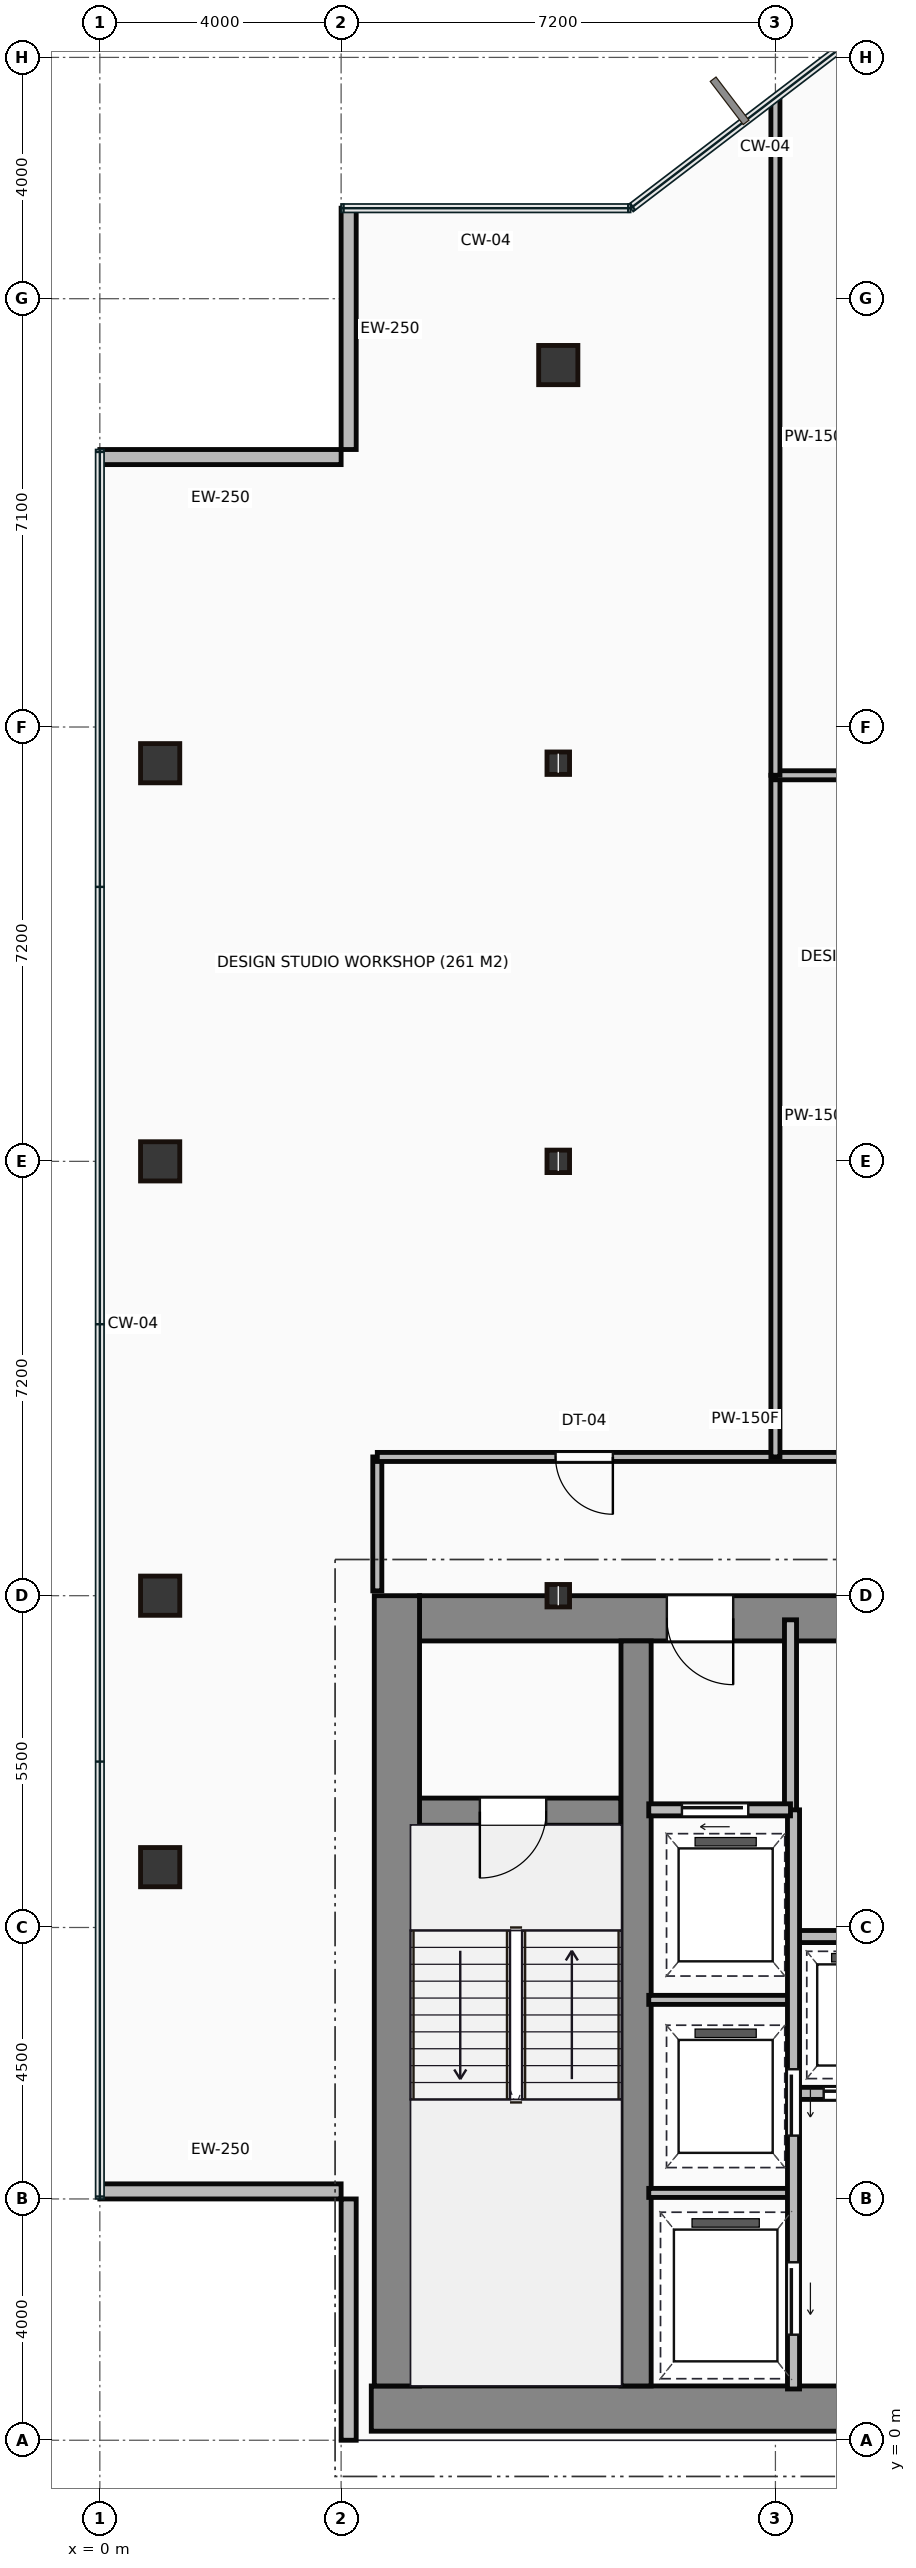
"""IFC4 building model, lengths in metres.
Left out: names, types, materials, properties, quantities, classifications, styles, units other than length and angle.
Written with IfcOpenShell. Run it as: python <this file> out.ifc"""

import sys

from ifc_helpers import new_model, si_unit, direction, frame, frame_2d, origin, origin_2d, place, context, subcontext, project, spatial, rectangle, hollow_rectangle, i_section, extrude, source, transform, mapped, element, fill, save


model = new_model("IFC4")
c1 = context("Model", 3, precision=1e-05, world=origin(), true_north=direction((0.0, 1.0)))
c2 = subcontext(c1, "Body", "Model", "MODEL_VIEW")
j1 = project(units=[si_unit("LENGTHUNIT", "METRE"), si_unit("PLANEANGLEUNIT", "RADIAN")], contexts=[c1])
p1 = place(None, origin())
s1 = spatial("IfcSite", under=j1, at=p1, CompositionType="ELEMENT")
p2 = place(p1, origin())
s2 = spatial("IfcBuilding", under=s1, at=p2, CompositionType="ELEMENT")
p3 = place(p2, frame((0.0, 0.0, 144.25)))
s3 = spatial("IfcBuildingStorey", under=s2, at=p3, CompositionType="ELEMENT", Elevation=144.25)
m1 = source(origin(), c2, "Body", "SweptSolid", [
    extrude(rectangle(XDim=29.5, YDim=0.75, at=frame_2d((14.75, 0.0))), origin(), (0.0, 0.0, 1.0), 3.65),
])
p4 = place(p3, frame((4.5, 0.525, 0.0), z_axis=(0.0, 0.0, 1.0), x_axis=(1.0, 0.0, 0.0)))
e1 = element("IfcWall", 1, at=p4, inside=s3, PredefinedType="SHEAR", context=c2, shape_type="MappedRepresentation", body=[
    mapped(m1, transform((0.0, 0.0, 0.0))),
])
m2 = source(origin(), c2, "Body", "SweptSolid", [
    extrude(rectangle(XDim=13.1, YDim=0.75, at=frame_2d((6.55, 0.0))), origin(), (0.0, 0.0, 1.0), 3.65),
])
p5 = place(p3, frame((4.925, 0.9, 0.0), z_axis=(0.0, 0.0, 1.0), x_axis=(0.0, 1.0, 0.0)))
e2 = element("IfcWall", 2, at=p5, inside=s3, PredefinedType="SHEAR", context=c2, shape_type="MappedRepresentation", body=[
    mapped(m2, transform((0.0, 0.0, 0.0))),
])
m3 = source(origin(), c2, "Body", "SweptSolid", [
    extrude(rectangle(XDim=9.1, YDim=0.75, at=frame_2d((4.55, 0.0))), origin(), (0.0, 0.0, 1.0), 3.65),
])
p6 = place(p3, frame((5.3, 13.625, 0.0), z_axis=(0.0, 0.0, 1.0), x_axis=(1.0, 0.0, 0.0)))
e3 = element("IfcWall", 3, at=p6, inside=s3, PredefinedType="SHEAR", context=c2, shape_type="MappedRepresentation", body=[
    mapped(m3, transform((0.0, 0.0, 0.0))),
])
p7 = place(p6, frame((4.1, 0.0, 0.0)))
e4 = element("IfcOpeningElement", 4, at=p7, cuts=e3, PredefinedType="OPENING", context=c2, shape_type="SweptSolid", body=[
    extrude(rectangle(XDim=1.1, YDim=2.15, at=frame_2d((0.55, 1.075))), frame((0.0, 0.385, 0.0), z_axis=(0.0, -1.0, 0.0), x_axis=(1.0, 0.0, 0.0)), (0.0, 0.0, 1.0), 0.77),
])
m4 = source(origin(), c2, "Body", "SweptSolid", [
    extrude(rectangle(XDim=12.35, YDim=0.5, at=frame_2d((6.175, 0.0))), origin(), (0.0, 0.0, 1.0), 3.65),
])
p8 = place(p3, frame((8.89, 0.9, 0.0), z_axis=(0.0, 0.0, 1.0), x_axis=(0.0, 1.0, 0.0)))
e5 = element("IfcWall", 5, at=p8, inside=s3, PredefinedType="SHEAR", context=c2, shape_type="MappedRepresentation", body=[
    mapped(m4, transform((0.0, 0.0, 0.0))),
])
m5 = source(origin(), c2, "Body", "SweptSolid", [
    extrude(rectangle(XDim=3.39, YDim=0.45, at=frame_2d((1.695, 0.0))), origin(), (0.0, 0.0, 1.0), 3.65),
])
p9 = place(p3, frame((5.25, 10.42, 0.0), z_axis=(0.0, 0.0, 1.0), x_axis=(1.0, 0.0, 0.0)))
e6 = element("IfcWall", 6, at=p9, inside=s3, PredefinedType="SHEAR", context=c2, shape_type="MappedRepresentation", body=[
    mapped(m5, transform((0.0, 0.0, 0.0))),
])
p10 = place(p9, frame((1.05, 0.0, 0.0)))
e7 = element("IfcOpeningElement", 7, at=p10, cuts=e6, PredefinedType="OPENING", context=c2, shape_type="SweptSolid", body=[
    extrude(rectangle(XDim=1.1, YDim=2.15, at=frame_2d((0.55, 1.075))), frame((0.0, 0.235, 0.0), z_axis=(0.0, -1.0, 0.0), x_axis=(1.0, 0.0, 0.0)), (0.0, 0.0, 1.0), 0.47),
])
m6 = source(origin(), c2, "Body", "SweptSolid", [
    extrude(hollow_rectangle(XDim=0.65, YDim=0.65, WallThickness=0.032, at=origin_2d()), origin(), (0.0, 0.0, 1.0), 3.65),
])
for number, where, z_axis, x_axis in (
    (8, (1.0, 9.5, 0.0), (0.0, 0.0, 1.0), (1.0, 0.0, 0.0)),
    (9, (1.0, 14.0, 0.0), (0.0, 0.0, 1.0), (1.0, 0.0, 0.0)),
    (10, (1.0, 21.2, 0.0), (0.0, 0.0, 1.0), (1.0, 0.0, 0.0)),
    (11, (1.0, 27.8, 0.0), (0.0, 0.0, 1.0), (1.0, 0.0, 0.0)),
):
    element("IfcColumn", number, at=place(p3, frame(where, z_axis=z_axis, x_axis=x_axis)), inside=s3, PredefinedType="COLUMN", context=c2, shape_type="MappedRepresentation", body=[
        mapped(m6, transform((0.0, 0.0, 0.0))),
    ])
m7 = source(origin(), c2, "Body", "SweptSolid", [
    extrude(i_section(OverallWidth=0.374, OverallDepth=0.372, WebThickness=0.016, FlangeThickness=0.026, at=origin_2d()), origin(), (0.0, 0.0, 1.0), 3.65),
])
for number, where, z_axis, x_axis in (
    (12, (7.6, 14.0, 0.0), (0.0, 0.0, 1.0), (1.0, 0.0, 0.0)),
    (13, (7.6, 21.2, 0.0), (0.0, 0.0, 1.0), (1.0, 0.0, 0.0)),
    (14, (7.6, 27.8, 0.0), (0.0, 0.0, 1.0), (1.0, 0.0, 0.0)),
):
    element("IfcColumn", number, at=place(p3, frame(where, z_axis=z_axis, x_axis=x_axis)), inside=s3, PredefinedType="COLUMN", context=c2, shape_type="MappedRepresentation", body=[
        mapped(m7, transform((0.0, 0.0, 0.0))),
    ])
p11 = place(p3, frame((7.6, 34.4, 0.0), z_axis=(0.0, 0.0, 1.0), x_axis=(1.0, 0.0, 0.0)))
e15 = element("IfcColumn", 15, at=p11, inside=s3, PredefinedType="COLUMN", context=c2, shape_type="MappedRepresentation", body=[
    mapped(m6, transform((0.0, 0.0, 0.0))),
])
m8 = source(origin(), c2, "Body", "SweptSolid", [
    extrude(rectangle(XDim=4.0, YDim=0.25, at=frame_2d((2.0, 0.0))), origin(), (0.0, 0.0, 1.0), 3.4),
])
for number, where, z_axis, x_axis in (
    (16, (4.125, 37.0, 0.0), (0.0, 0.0, 1.0), (0.0, -1.0, 0.0)),
    (17, (4.0, 32.875, 0.0), (0.0, 0.0, 1.0), (-1.0, 0.0, 0.0)),
    (18, (0.0, 4.125, 0.0), (0.0, 0.0, 1.0), (1.0, 0.0, 0.0)),
    (19, (4.125, 4.0, 0.0), (0.0, 0.0, 1.0), (0.0, -1.0, 0.0)),
):
    element("IfcWall", number, at=place(p3, frame(where, z_axis=z_axis, x_axis=x_axis)), inside=s3, PredefinedType="STANDARD", context=c2, shape_type="MappedRepresentation", body=[
        mapped(m8, transform((0.0, 0.0, 0.0))),
    ])
m9 = source(origin(), c2, "Body", "SweptSolid", [
    extrude(rectangle(XDim=3.18, YDim=0.2, at=frame_2d((1.59, 0.0))), origin(), (0.0, 0.0, 1.0), 3.4),
])
p12 = place(p3, frame((11.45, 10.42, 0.0), z_axis=(0.0, 0.0, 1.0), x_axis=(0.0, 1.0, 0.0)))
e20 = element("IfcWall", 20, at=p12, inside=s3, PredefinedType="PARTITIONING", context=c2, shape_type="MappedRepresentation", body=[
    mapped(m9, transform((0.0, 0.0, 0.0))),
])
m10 = source(origin(), c2, "Body", "SweptSolid", [
    extrude(rectangle(XDim=2.35, YDim=0.2, at=frame_2d((1.175, 0.0))), origin(), (0.0, 0.0, 1.0), 3.4),
])
p13 = place(p3, frame((9.1, 10.45, 0.0), z_axis=(0.0, 0.0, 1.0), x_axis=(1.0, 0.0, 0.0)))
e21 = element("IfcWall", 21, at=p13, inside=s3, PredefinedType="PARTITIONING", context=c2, shape_type="MappedRepresentation", body=[
    mapped(m10, transform((0.0, 0.0, 0.0))),
])
p14 = place(p13, frame((0.55, 0.0, 0.0)))
e22 = element("IfcOpeningElement", 22, at=p14, cuts=e21, PredefinedType="OPENING", context=c2, shape_type="SweptSolid", body=[
    extrude(rectangle(XDim=1.1, YDim=2.15, at=frame_2d((0.55, 1.075))), frame((0.0, 0.11, 0.0), z_axis=(0.0, -1.0, 0.0), x_axis=(1.0, 0.0, 0.0)), (0.0, 0.0, 1.0), 0.22),
])
m11 = source(origin(), c2, "Body", "SweptSolid", [
    extrude(rectangle(XDim=9.6, YDim=0.2, at=frame_2d((4.8, 0.0))), origin(), (0.0, 0.0, 1.0), 3.4),
])
p15 = place(p3, frame((11.5, 0.85, 0.0), z_axis=(0.0, 0.0, 1.0), x_axis=(0.0, 1.0, 0.0)))
e23 = element("IfcWall", 23, at=p15, inside=s3, PredefinedType="PARTITIONING", context=c2, shape_type="MappedRepresentation", body=[
    mapped(m11, transform((0.0, 0.0, 0.0))),
])
p16 = place(p15, frame((4.2, 0.0, 0.0)))
e24 = element("IfcOpeningElement", 24, at=p16, cuts=e23, PredefinedType="OPENING", context=c2, shape_type="SweptSolid", body=[
    extrude(rectangle(XDim=1.1, YDim=2.15, at=frame_2d((0.55, 1.075))), frame((0.0, 0.11, 0.0), z_axis=(0.0, -1.0, 0.0), x_axis=(1.0, 0.0, 0.0)), (0.0, 0.0, 1.0), 0.22),
])
p17 = place(p15, frame((0.9, 0.0, 0.0)))
e25 = element("IfcOpeningElement", 25, at=p17, cuts=e23, PredefinedType="OPENING", context=c2, shape_type="SweptSolid", body=[
    extrude(rectangle(XDim=1.2, YDim=2.15, at=frame_2d((0.6, 1.075))), frame((0.0, 0.11, 0.0), z_axis=(0.0, -1.0, 0.0), x_axis=(1.0, 0.0, 0.0)), (0.0, 0.0, 1.0), 0.22),
])
m12 = source(origin(), c2, "Body", "SweptSolid", [
    extrude(rectangle(XDim=2.4, YDim=0.15, at=frame_2d((1.2, 0.0))), origin(), (0.0, 0.0, 1.0), 3.4),
])
for number, where, z_axis, x_axis in (
    (26, (9.1, 4.1, 0.0), (0.0, 0.0, 1.0), (1.0, 0.0, 0.0)),
    (27, (9.1, 7.3, 0.0), (0.0, 0.0, 1.0), (1.0, 0.0, 0.0)),
):
    element("IfcWall", number, at=place(p3, frame(where, z_axis=z_axis, x_axis=x_axis)), inside=s3, PredefinedType="PARTITIONING", context=c2, shape_type="MappedRepresentation", body=[
        mapped(m12, transform((0.0, 0.0, 0.0))),
    ])
m13 = source(origin(), c2, "Body", "SweptSolid", [
    extrude(rectangle(XDim=11.85, YDim=0.2, at=frame_2d((5.925, 0.0))), origin(), (0.0, 0.0, 1.0), 3.4),
])
p18 = place(p3, frame((11.55, 5.75, 0.0), z_axis=(0.0, 0.0, 1.0), x_axis=(1.0, 0.0, 0.0)))
e28 = element("IfcWall", 28, at=p18, inside=s3, PredefinedType="PARTITIONING", context=c2, shape_type="MappedRepresentation", body=[
    mapped(m13, transform((0.0, 0.0, 0.0))),
])
p19 = place(p18, frame((0.45, 0.0, 0.0)))
e29 = element("IfcOpeningElement", 29, at=p19, cuts=e28, PredefinedType="OPENING", context=c2, shape_type="SweptSolid", body=[
    extrude(rectangle(XDim=1.05, YDim=2.15, at=frame_2d((0.525, 1.075))), frame((0.0, 0.11, 0.0), z_axis=(0.0, -1.0, 0.0), x_axis=(1.0, 0.0, 0.0)), (0.0, 0.0, 1.0), 0.22),
])
p20 = place(p18, frame((2.4, 0.0, 0.0)))
e30 = element("IfcOpeningElement", 30, at=p20, cuts=e28, PredefinedType="OPENING", context=c2, shape_type="SweptSolid", body=[
    extrude(rectangle(XDim=1.05, YDim=2.15, at=frame_2d((0.525, 1.075))), frame((0.0, 0.11, 0.0), z_axis=(0.0, -1.0, 0.0), x_axis=(1.0, 0.0, 0.0)), (0.0, 0.0, 1.0), 0.22),
])
p21 = place(p18, frame((4.35, 0.0, 0.0)))
e31 = element("IfcOpeningElement", 31, at=p21, cuts=e28, PredefinedType="OPENING", context=c2, shape_type="SweptSolid", body=[
    extrude(rectangle(XDim=1.05, YDim=2.15, at=frame_2d((0.525, 1.075))), frame((0.0, 0.11, 0.0), z_axis=(0.0, -1.0, 0.0), x_axis=(1.0, 0.0, 0.0)), (0.0, 0.0, 1.0), 0.22),
])
p22 = place(p18, frame((6.3, 0.0, 0.0)))
e32 = element("IfcOpeningElement", 32, at=p22, cuts=e28, PredefinedType="OPENING", context=c2, shape_type="SweptSolid", body=[
    extrude(rectangle(XDim=1.05, YDim=2.15, at=frame_2d((0.525, 1.075))), frame((0.0, 0.11, 0.0), z_axis=(0.0, -1.0, 0.0), x_axis=(1.0, 0.0, 0.0)), (0.0, 0.0, 1.0), 0.22),
])
p23 = place(p18, frame((8.25, 0.0, 0.0)))
e33 = element("IfcOpeningElement", 33, at=p23, cuts=e28, PredefinedType="OPENING", context=c2, shape_type="SweptSolid", body=[
    extrude(rectangle(XDim=1.05, YDim=2.15, at=frame_2d((0.525, 1.075))), frame((0.0, 0.11, 0.0), z_axis=(0.0, -1.0, 0.0), x_axis=(1.0, 0.0, 0.0)), (0.0, 0.0, 1.0), 0.22),
])
p24 = place(p18, frame((10.2, 0.0, 0.0)))
e34 = element("IfcOpeningElement", 34, at=p24, cuts=e28, PredefinedType="OPENING", context=c2, shape_type="SweptSolid", body=[
    extrude(rectangle(XDim=1.05, YDim=2.15, at=frame_2d((0.525, 1.075))), frame((0.0, 0.11, 0.0), z_axis=(0.0, -1.0, 0.0), x_axis=(1.0, 0.0, 0.0)), (0.0, 0.0, 1.0), 0.22),
])
p25 = place(p3, frame((11.55, 8.35, 0.0), z_axis=(0.0, 0.0, 1.0), x_axis=(1.0, 0.0, 0.0)))
e35 = element("IfcWall", 35, at=p25, inside=s3, PredefinedType="PARTITIONING", context=c2, shape_type="MappedRepresentation", body=[
    mapped(m13, transform((0.0, 0.0, 0.0))),
])
m14 = source(origin(), c2, "Body", "SweptSolid", [
    extrude(rectangle(XDim=2.22, YDim=0.15, at=frame_2d((1.11, 0.0))), origin(), (0.0, 0.0, 1.0), 3.4),
])
p26 = place(p3, frame((4.6, 14.08, 0.0), z_axis=(0.0, 0.0, 1.0), x_axis=(0.0, 1.0, 0.0)))
e36 = element("IfcWall", 36, at=p26, inside=s3, PredefinedType="PARTITIONING", context=c2, shape_type="MappedRepresentation", body=[
    mapped(m14, transform((0.0, 0.0, 0.0))),
])
m15 = source(origin(), c2, "Body", "SweptSolid", [
    extrude(rectangle(XDim=12.2, YDim=0.15, at=frame_2d((6.1, 0.0))), origin(), (0.0, 0.0, 1.0), 3.4),
])
p27 = place(p3, frame((4.6, 16.3, 0.0), z_axis=(0.0, 0.0, 1.0), x_axis=(1.0, 0.0, 0.0)))
e37 = element("IfcWall", 37, at=p27, inside=s3, PredefinedType="PARTITIONING", context=c2, shape_type="MappedRepresentation", body=[
    mapped(m15, transform((0.0, 0.0, 0.0))),
])
p28 = place(p27, frame((2.955, 0.0, 0.0)))
e38 = element("IfcOpeningElement", 38, at=p28, cuts=e37, PredefinedType="OPENING", context=c2, shape_type="SweptSolid", body=[
    extrude(rectangle(XDim=0.95, YDim=2.15, at=frame_2d((0.475, 1.075))), frame((0.0, 0.085, 0.0), z_axis=(0.0, -1.0, 0.0), x_axis=(1.0, 0.0, 0.0)), (0.0, 0.0, 1.0), 0.17),
])
m16 = source(origin(), c2, "Body", "SweptSolid", [
    extrude(rectangle(XDim=11.3, YDim=0.15, at=frame_2d((5.65, 0.0))), origin(), (0.0, 0.0, 1.0), 3.4),
])
p29 = place(p3, frame((11.2, 27.6, 0.0), z_axis=(0.0, 0.0, 1.0), x_axis=(0.0, -1.0, 0.0)))
e39 = element("IfcWall", 39, at=p29, inside=s3, PredefinedType="PARTITIONING", context=c2, shape_type="MappedRepresentation", body=[
    mapped(m16, transform((0.0, 0.0, 0.0))),
])
m17 = source(origin(), c2, "Body", "SweptSolid", [
    extrude(rectangle(XDim=5.6, YDim=0.15, at=frame_2d((2.8, 0.0))), origin(), (0.0, 0.0, 1.0), 3.4),
])
p30 = place(p3, frame((11.2, 27.6, 0.0), z_axis=(0.0, 0.0, 1.0), x_axis=(1.0, 0.0, 0.0)))
e40 = element("IfcWall", 40, at=p30, inside=s3, PredefinedType="PARTITIONING", context=c2, shape_type="MappedRepresentation", body=[
    mapped(m17, transform((0.0, 0.0, 0.0))),
])
m18 = source(origin(), c2, "Body", "SweptSolid", [
    extrude(rectangle(XDim=11.206, YDim=0.15, at=frame_2d((5.603, 0.0))), origin(), (0.0, 0.0, 1.0), 3.4),
])
p31 = place(p3, frame((11.2, 38.806, 0.0), z_axis=(0.0, 0.0, 1.0), x_axis=(0.0, -1.0, 0.0)))
e41 = element("IfcWall", 41, at=p31, inside=s3, PredefinedType="PARTITIONING", context=c2, shape_type="MappedRepresentation", body=[
    mapped(m18, transform((0.0, 0.0, 0.0))),
])
m19 = source(origin(), c2, "Body", "SweptSolid", [
    extrude(rectangle(XDim=1.1, YDim=2.15, at=frame_2d((0.55, 1.075))), frame((0.0, 0.025, 0.0), z_axis=(0.0, -1.0, 0.0), x_axis=(1.0, 0.0, 0.0)), (0.0, 0.0, 1.0), 0.05),
])
p32 = place(p10, frame((1.1, 0.0, 0.0), z_axis=(0.0, 0.0, 1.0), x_axis=(-1.0, 0.0, 0.0)))
e42 = element("IfcDoor", 42, at=p32, inside=s3, OperationType="SINGLE_SWING_LEFT", PredefinedType="DOOR", context=c2, shape_type="MappedRepresentation", body=[
    mapped(m19, transform((0.0, 0.0, 0.0))),
])
fill(e7, e42)
p33 = place(p7, origin())
e43 = element("IfcDoor", 43, at=p33, inside=s3, OperationType="SINGLE_SWING_RIGHT", PredefinedType="DOOR", context=c2, shape_type="MappedRepresentation", body=[
    mapped(m19, transform((0.0, 0.0, 0.0))),
])
fill(e4, e43)
p34 = place(p14, origin())
e44 = element("IfcDoor", 44, at=p34, inside=s3, OperationType="SLIDING_TO_LEFT", PredefinedType="DOOR", context=c2, shape_type="MappedRepresentation", body=[
    mapped(m19, transform((0.0, 0.0, 0.0))),
])
fill(e22, e44)
p35 = place(p16, frame((1.1, 0.0, 0.0), z_axis=(0.0, 0.0, 1.0), x_axis=(-1.0, 0.0, 0.0)))
e45 = element("IfcDoor", 45, at=p35, inside=s3, OperationType="SLIDING_TO_LEFT", PredefinedType="DOOR", context=c2, shape_type="MappedRepresentation", body=[
    mapped(m19, transform((0.0, 0.0, 0.0))),
])
fill(e24, e45)
m20 = source(origin(), c2, "Body", "SweptSolid", [
    extrude(rectangle(XDim=1.2, YDim=2.15, at=frame_2d((0.6, 1.075))), frame((0.0, 0.025, 0.0), z_axis=(0.0, -1.0, 0.0), x_axis=(1.0, 0.0, 0.0)), (0.0, 0.0, 1.0), 0.05),
])
p36 = place(p17, frame((1.2, 0.0, 0.0), z_axis=(0.0, 0.0, 1.0), x_axis=(-1.0, 0.0, 0.0)))
e46 = element("IfcDoor", 46, at=p36, inside=s3, OperationType="SLIDING_TO_LEFT", PredefinedType="DOOR", context=c2, shape_type="MappedRepresentation", body=[
    mapped(m20, transform((0.0, 0.0, 0.0))),
])
fill(e25, e46)
m21 = source(origin(), c2, "Body", "SweptSolid", [
    extrude(rectangle(XDim=1.05, YDim=2.15, at=frame_2d((0.525, 1.075))), frame((0.0, 0.025, 0.0), z_axis=(0.0, -1.0, 0.0), x_axis=(1.0, 0.0, 0.0)), (0.0, 0.0, 1.0), 0.05),
])
p37 = place(p19, frame((1.05, 0.0, 0.0), z_axis=(0.0, 0.0, 1.0), x_axis=(-1.0, 0.0, 0.0)))
e47 = element("IfcDoor", 47, at=p37, inside=s3, OperationType="SLIDING_TO_LEFT", PredefinedType="DOOR", context=c2, shape_type="MappedRepresentation", body=[
    mapped(m21, transform((0.0, 0.0, 0.0))),
])
fill(e29, e47)
m22 = source(origin(), c2, "Body", "SweptSolid", [
    extrude(rectangle(XDim=0.95, YDim=2.15, at=frame_2d((0.475, 1.075))), frame((0.0, 0.025, 0.0), z_axis=(0.0, -1.0, 0.0), x_axis=(1.0, 0.0, 0.0)), (0.0, 0.0, 1.0), 0.05),
])
p38 = place(p28, origin())
e48 = element("IfcDoor", 48, at=p38, inside=s3, OperationType="SINGLE_SWING_RIGHT", PredefinedType="DOOR", context=c2, shape_type="MappedRepresentation", body=[
    mapped(m22, transform((0.0, 0.0, 0.0))),
])
fill(e38, e48)
save(model, sys.argv[1])
